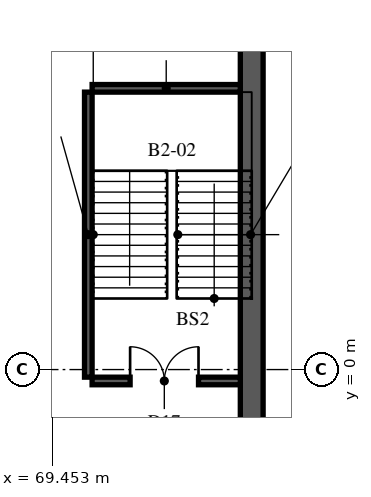
"""IFC4 building model, lengths in metres.
Left out: names, types, materials, properties, quantities, classifications, styles, units other than length and angle.
Written with IfcOpenShell. Run it as: python <this file> out.ifc"""

import sys

from ifc_helpers import new_model, si_unit, direction, frame, frame_2d, origin, place, context, subcontext, project, spatial, rectangle, extrude, element, fill, save


model = new_model("IFC4")
c1 = context("Model", 3, precision=1e-05, world=origin(), true_north=direction((0.0, 1.0)))
c2 = subcontext(c1, "Body", "Model", "MODEL_VIEW")
j1 = project(units=[si_unit("LENGTHUNIT", "METRE"), si_unit("PLANEANGLEUNIT", "RADIAN")], contexts=[c1])
p1 = place(None, origin())
s1 = spatial("IfcSite", under=j1, at=p1, CompositionType="ELEMENT")
p2 = place(p1, origin())
s2 = spatial("IfcBuilding", under=s1, at=p2, CompositionType="ELEMENT")
p3 = place(p2, frame((0.0, 0.0, -7.5)))
s3 = spatial("IfcBuildingStorey", under=s2, at=p3, CompositionType="ELEMENT", Elevation=-7.5)
p4 = place(p3, frame((74.7, -16.9, 0.0), z_axis=(0.0, 0.0, 1.0), x_axis=(0.0, 1.0, 0.0)))
e1 = element("IfcWall", 1, at=p4, inside=s3, PredefinedType="SOLIDWALL", context=c2, shape_type="SweptSolid", body=[
    extrude(rectangle(XDim=73.8, YDim=0.6, at=frame_2d((36.9, 0.0))), origin(), (0.0, 0.0, 1.0), 3.5),
])
p5 = place(p3, frame((70.4, -0.2, 0.0), z_axis=(0.0, 0.0, 1.0), x_axis=(0.0, 1.0, 0.0)))
e2 = element("IfcWall", 2, at=p5, inside=s3, PredefinedType="SOLIDWALL", context=c2, shape_type="SweptSolid", body=[
    extrude(rectangle(XDim=7.5, YDim=0.2, at=frame_2d((3.75, 0.0))), origin(), (0.0, 0.0, 1.0), 3.5),
])
p6 = place(p3, frame((70.5, -0.3, 0.0), z_axis=(0.0, 0.0, 1.0), x_axis=(1.0, 0.0, 0.0)))
e3 = element("IfcWall", 3, at=p6, inside=s3, PredefinedType="SOLIDWALL", context=c2, shape_type="SweptSolid", body=[
    extrude(rectangle(XDim=3.9, YDim=0.2, at=frame_2d((1.95, 0.0))), origin(), (0.0, 0.0, 1.0), 3.5),
])
p7 = place(p6, frame((1.0, 0.0, 0.0)))
e4 = element("IfcOpeningElement", 4, at=p7, cuts=e3, PredefinedType="OPENING", context=c2, shape_type="SweptSolid", body=[
    extrude(rectangle(XDim=1.8, YDim=2.2, at=frame_2d((0.9, 1.1))), frame((0.0, 0.11, 0.0), z_axis=(0.0, -1.0, 0.0), x_axis=(1.0, 0.0, 0.0)), (0.0, 0.0, 1.0), 0.22),
])
p8 = place(p3, frame((70.5, 7.4, 0.0), z_axis=(0.0, 0.0, 1.0), x_axis=(1.0, 0.0, 0.0)))
e5 = element("IfcWall", 5, at=p8, inside=s3, PredefinedType="SOLIDWALL", context=c2, shape_type="SweptSolid", body=[
    extrude(rectangle(XDim=3.9, YDim=0.2, at=frame_2d((1.95, 0.0))), origin(), (0.0, 0.0, 1.0), 3.5),
])
p9 = place(p7, origin())
e6 = element("IfcDoor", 6, at=p9, inside=s3, OperationType="DOUBLE_DOOR_SINGLE_SWING", PredefinedType="DOOR", context=c2, shape_type="SweptSolid", body=[
    extrude(rectangle(XDim=1.8, YDim=2.2, at=frame_2d((0.9, 1.1))), frame((0.0, 0.025, 0.0), z_axis=(0.0, -1.0, 0.0), x_axis=(1.0, 0.0, 0.0)), (0.0, 0.0, 1.0), 0.05),
])
fill(e4, e6)
save(model, sys.argv[1])
